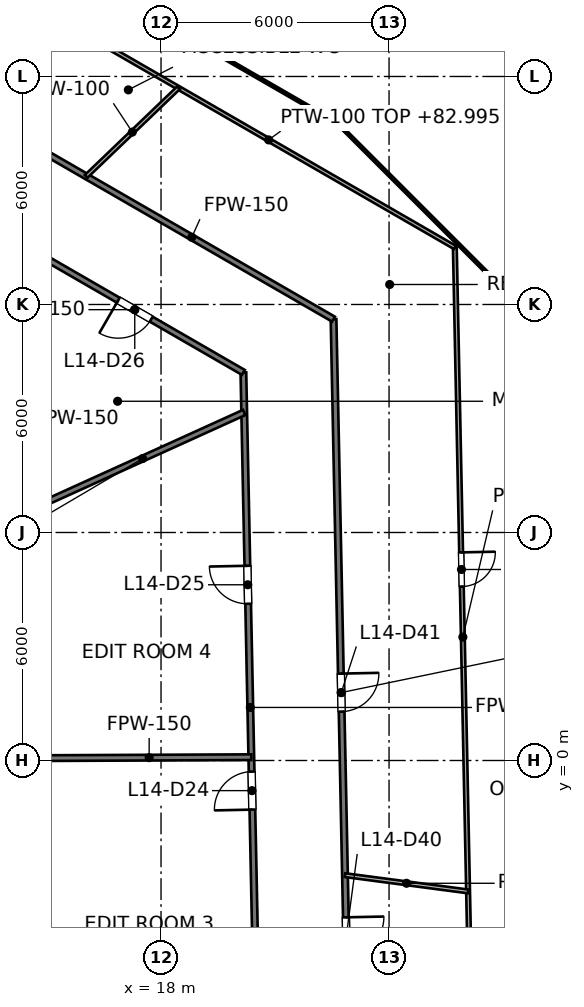
"""IFC4 building model, lengths in metres.
Left out: names, types, materials, properties, quantities, classifications, styles, units other than length and angle.
Written with IfcOpenShell. Run it as: python <this file> out.ifc"""

import sys

from ifc_helpers import new_model, si_unit, direction, frame, frame_2d, origin, place, context, subcontext, project, spatial, rectangle, extrude, element, fill, save


model = new_model("IFC4")
c1 = context("Model", 3, precision=1e-05, world=origin(), true_north=direction((0.0, 1.0)))
c2 = subcontext(c1, "Body", "Model", "MODEL_VIEW")
j1 = project(units=[si_unit("LENGTHUNIT", "METRE"), si_unit("PLANEANGLEUNIT", "RADIAN")], contexts=[c1])
p1 = place(None, origin())
s1 = spatial("IfcSite", under=j1, at=p1, CompositionType="ELEMENT")
p2 = place(p1, origin())
s2 = spatial("IfcBuilding", under=s1, at=p2, CompositionType="ELEMENT")
p3 = place(p2, frame((0.0, 0.0, 79.8)))
s3 = spatial("IfcBuildingStorey", under=s2, at=p3, CompositionType="ELEMENT", Elevation=79.8)
p4 = place(p3, frame((20.167, 10.213, 0.0), z_axis=(0.0, 0.0, 1.0), x_axis=(0.020597058382, -0.999787858091, 0.0)))
e1 = element("IfcWall", 1, at=p4, inside=s3, PredefinedType="PARTITIONING", context=c2, shape_type="SweptSolid", body=[
    extrude(rectangle(XDim=17.637, YDim=0.15, at=frame_2d((8.819, 0.0))), origin(), (0.0, 0.0, 1.0), 3.118),
])
p5 = place(p4, frame((10.508, 0.0, 0.0)))
e2 = element("IfcOpeningElement", 2, at=p5, cuts=e1, PredefinedType="OPENING", context=c2, shape_type="SweptSolid", body=[
    extrude(rectangle(XDim=1.0, YDim=2.1, at=frame_2d((0.5, 1.05))), frame((0.0, 0.075, 0.0), z_axis=(0.0, -1.0, 0.0), x_axis=(1.0, 0.0, 0.0)), (0.0, 0.0, 1.0), 0.15),
])
p6 = place(p4, frame((5.09, 0.0, 0.0)))
e3 = element("IfcOpeningElement", 3, at=p6, cuts=e1, PredefinedType="OPENING", context=c2, shape_type="SweptSolid", body=[
    extrude(rectangle(XDim=1.0, YDim=2.1, at=frame_2d((0.5, 1.05))), frame((0.0, 0.075, 0.0), z_axis=(0.0, -1.0, 0.0), x_axis=(1.0, 0.0, 0.0)), (0.0, 0.0, 1.0), 0.15),
])
p7 = place(p3, frame((22.539, 11.615, 0.0), z_axis=(0.0, 0.0, 1.0), x_axis=(0.020589093921, -0.999788022138, 0.0)))
e4 = element("IfcWall", 4, at=p7, inside=s3, PredefinedType="PARTITIONING", context=c2, shape_type="SweptSolid", body=[
    extrude(rectangle(XDim=19.66, YDim=0.15, at=frame_2d((9.83, 0.0))), origin(), (0.0, 0.0, 1.0), 3.118),
])
p8 = place(p7, frame((15.745, 0.0, 0.0)))
e5 = element("IfcOpeningElement", 5, at=p8, cuts=e4, PredefinedType="OPENING", context=c2, shape_type="SweptSolid", body=[
    extrude(rectangle(XDim=1.0, YDim=2.1, at=frame_2d((0.5, 1.05))), frame((0.0, 0.075, 0.0), z_axis=(0.0, -1.0, 0.0), x_axis=(1.0, 0.0, 0.0)), (0.0, 0.0, 1.0), 0.15),
])
p9 = place(p7, frame((9.331, 0.0, 0.0)))
e6 = element("IfcOpeningElement", 6, at=p9, cuts=e4, PredefinedType="OPENING", context=c2, shape_type="SweptSolid", body=[
    extrude(rectangle(XDim=1.0, YDim=2.1, at=frame_2d((0.5, 1.05))), frame((0.0, 0.075, 0.0), z_axis=(0.0, -1.0, 0.0), x_axis=(1.0, 0.0, 0.0)), (0.0, 0.0, 1.0), 0.15),
])
p10 = place(p3, frame((14.448, 13.515, 0.0), z_axis=(0.0, 0.0, 1.0), x_axis=(0.865975016585, -0.500087263036, 0.0)))
e7 = element("IfcWall", 7, at=p10, inside=s3, PredefinedType="PARTITIONING", context=c2, shape_type="SweptSolid", body=[
    extrude(rectangle(XDim=6.604, YDim=0.15, at=frame_2d((3.302, 0.0))), origin(), (0.0, 0.0, 1.0), 3.195),
])
p11 = place(p10, frame((2.803, 0.0, 0.0)))
e8 = element("IfcOpeningElement", 8, at=p11, cuts=e7, PredefinedType="OPENING", context=c2, shape_type="SweptSolid", body=[
    extrude(rectangle(XDim=1.0, YDim=2.1, at=frame_2d((0.5, 1.05))), frame((0.0, 0.075, 0.0), z_axis=(0.0, -1.0, 0.0), x_axis=(1.0, 0.0, 0.0)), (0.0, 0.0, 1.0), 0.15),
])
p12 = place(p3, frame((15.08, 15.921, 0.0), z_axis=(0.0, 0.0, 1.0), x_axis=(0.865982112089, -0.50007497592, 0.0)))
e9 = element("IfcWall", 9, at=p12, inside=s3, PredefinedType="PARTITIONING", context=c2, shape_type="SweptSolid", body=[
    extrude(rectangle(XDim=8.613, YDim=0.15, at=frame_2d((4.306, 0.0))), origin(), (0.0, 0.0, 1.0), 3.195),
])
p13 = place(p3, frame((15.0, 0.063, 0.0), z_axis=(0.0, 0.0, 1.0), x_axis=(0.999990294223, 0.004405843865, 0.0)))
e10 = element("IfcWall", 10, at=p13, inside=s3, PredefinedType="PARTITIONING", context=c2, shape_type="SweptSolid", body=[
    extrude(rectangle(XDim=5.375, YDim=0.15, at=frame_2d((2.688, 0.0))), origin(), (0.0, 0.0, 1.0), 3.195),
])
p14 = place(p3, frame((14.843, 6.733, 0.0), z_axis=(0.0, 0.0, 1.0), x_axis=(0.910628361306, 0.413226315214, 0.0)))
e11 = element("IfcWall", 11, at=p14, inside=s3, PredefinedType="PARTITIONING", context=c2, shape_type="SweptSolid", body=[
    extrude(rectangle(XDim=5.87, YDim=0.15, at=frame_2d((2.935, 0.0))), origin(), (0.0, 0.0, 1.0), 4.05),
])
p15 = place(p3, frame((25.731, 13.502, 0.0), z_axis=(0.0, 0.0, 1.0), x_axis=(0.020564874759, -0.999788520601, 0.0)))
e12 = element("IfcWall", 12, at=p15, inside=s3, PredefinedType="PARTITIONING", context=c2, shape_type="SweptSolid", body=[
    extrude(rectangle(XDim=20.514, YDim=0.1, at=frame_2d((10.257, 0.0))), origin(), (0.0, 0.0, 1.0), 3.118),
])
p16 = place(p15, frame((8.027, 0.0, 0.0)))
e13 = element("IfcOpeningElement", 13, at=p16, cuts=e12, PredefinedType="OPENING", context=c2, shape_type="SweptSolid", body=[
    extrude(rectangle(XDim=0.9, YDim=2.1, at=frame_2d((0.45, 1.05))), frame((0.0, 0.05, 0.0), z_axis=(0.0, -1.0, 0.0), x_axis=(1.0, 0.0, 0.0)), (0.0, 0.0, 1.0), 0.1),
])
p17 = place(p3, frame((15.931, 19.16, 0.0), z_axis=(0.0, 0.0, 1.0), x_axis=(0.866053377516, -0.499951544945, 0.0)))
e14 = element("IfcWall", 14, at=p17, inside=s3, PredefinedType="PARTITIONING", context=c2, shape_type="SweptSolid", body=[
    extrude(rectangle(XDim=11.316, YDim=0.1, at=frame_2d((5.658, 0.0))), origin(), (0.0, 0.0, 1.0), 3.195),
])
p18 = place(p3, frame((22.841, -3.017, 0.0), z_axis=(0.0, 0.0, 1.0), x_axis=(0.991388314311, -0.130954993217, 0.0)))
e15 = element("IfcWall", 15, at=p18, inside=s3, PredefinedType="PARTITIONING", context=c2, shape_type="SweptSolid", body=[
    extrude(rectangle(XDim=3.268, YDim=0.1, at=frame_2d((1.634, 0.0))), origin(), (0.0, 0.0, 1.0), 4.05),
])
p19 = place(p3, frame((16.03, 15.372, 0.0), z_axis=(0.0, 0.0, 1.0), x_axis=(0.721823579431, 0.692077105659, 0.0)))
e16 = element("IfcWall", 16, at=p19, inside=s3, PredefinedType="PARTITIONING", context=c2, shape_type="SweptSolid", body=[
    extrude(rectangle(XDim=3.365, YDim=0.1, at=frame_2d((1.683, 0.0))), origin(), (0.0, 0.0, 1.0), 4.05),
])
p20 = place(p5, origin())
e17 = element("IfcDoor", 17, at=p20, inside=s3, OperationType="SINGLE_SWING_RIGHT", PredefinedType="DOOR", context=c2, shape_type="SweptSolid", body=[
    extrude(rectangle(XDim=1.0, YDim=2.1, at=frame_2d((0.5, 1.05))), frame((0.0, 0.025, 0.0), z_axis=(0.0, -1.0, 0.0), x_axis=(1.0, 0.0, 0.0)), (0.0, 0.0, 1.0), 0.05),
])
fill(e2, e17)
p21 = place(p6, origin())
e18 = element("IfcDoor", 18, at=p21, inside=s3, OperationType="SINGLE_SWING_LEFT", PredefinedType="DOOR", context=c2, shape_type="SweptSolid", body=[
    extrude(rectangle(XDim=1.0, YDim=2.1, at=frame_2d((0.5, 1.05))), frame((0.0, 0.025, 0.0), z_axis=(0.0, -1.0, 0.0), x_axis=(1.0, 0.0, 0.0)), (0.0, 0.0, 1.0), 0.05),
])
fill(e3, e18)
p22 = place(p11, origin())
e19 = element("IfcDoor", 19, at=p22, inside=s3, OperationType="SINGLE_SWING_LEFT", PredefinedType="DOOR", context=c2, shape_type="SweptSolid", body=[
    extrude(rectangle(XDim=1.0, YDim=2.1, at=frame_2d((0.5, 1.05))), frame((0.0, 0.025, 0.0), z_axis=(0.0, -1.0, 0.0), x_axis=(1.0, 0.0, 0.0)), (0.0, 0.0, 1.0), 0.05),
])
fill(e8, e19)
p23 = place(p8, origin())
e20 = element("IfcDoor", 20, at=p23, inside=s3, OperationType="SINGLE_SWING_LEFT", PredefinedType="DOOR", context=c2, shape_type="SweptSolid", body=[
    extrude(rectangle(XDim=1.0, YDim=2.1, at=frame_2d((0.5, 1.05))), frame((0.0, 0.025, 0.0), z_axis=(0.0, -1.0, 0.0), x_axis=(1.0, 0.0, 0.0)), (0.0, 0.0, 1.0), 0.05),
])
fill(e5, e20)
p24 = place(p9, origin())
e21 = element("IfcDoor", 21, at=p24, inside=s3, OperationType="SINGLE_SWING_LEFT", PredefinedType="DOOR", context=c2, shape_type="SweptSolid", body=[
    extrude(rectangle(XDim=1.0, YDim=2.1, at=frame_2d((0.5, 1.05))), frame((0.0, 0.025, 0.0), z_axis=(0.0, -1.0, 0.0), x_axis=(1.0, 0.0, 0.0)), (0.0, 0.0, 1.0), 0.05),
])
fill(e6, e21)
p25 = place(p16, origin())
e22 = element("IfcDoor", 22, at=p25, inside=s3, OperationType="SINGLE_SWING_LEFT", PredefinedType="DOOR", context=c2, shape_type="SweptSolid", body=[
    extrude(rectangle(XDim=0.9, YDim=2.1, at=frame_2d((0.45, 1.05))), frame((0.0, 0.025, 0.0), z_axis=(0.0, -1.0, 0.0), x_axis=(1.0, 0.0, 0.0)), (0.0, 0.0, 1.0), 0.05),
])
fill(e13, e22)
save(model, sys.argv[1])
